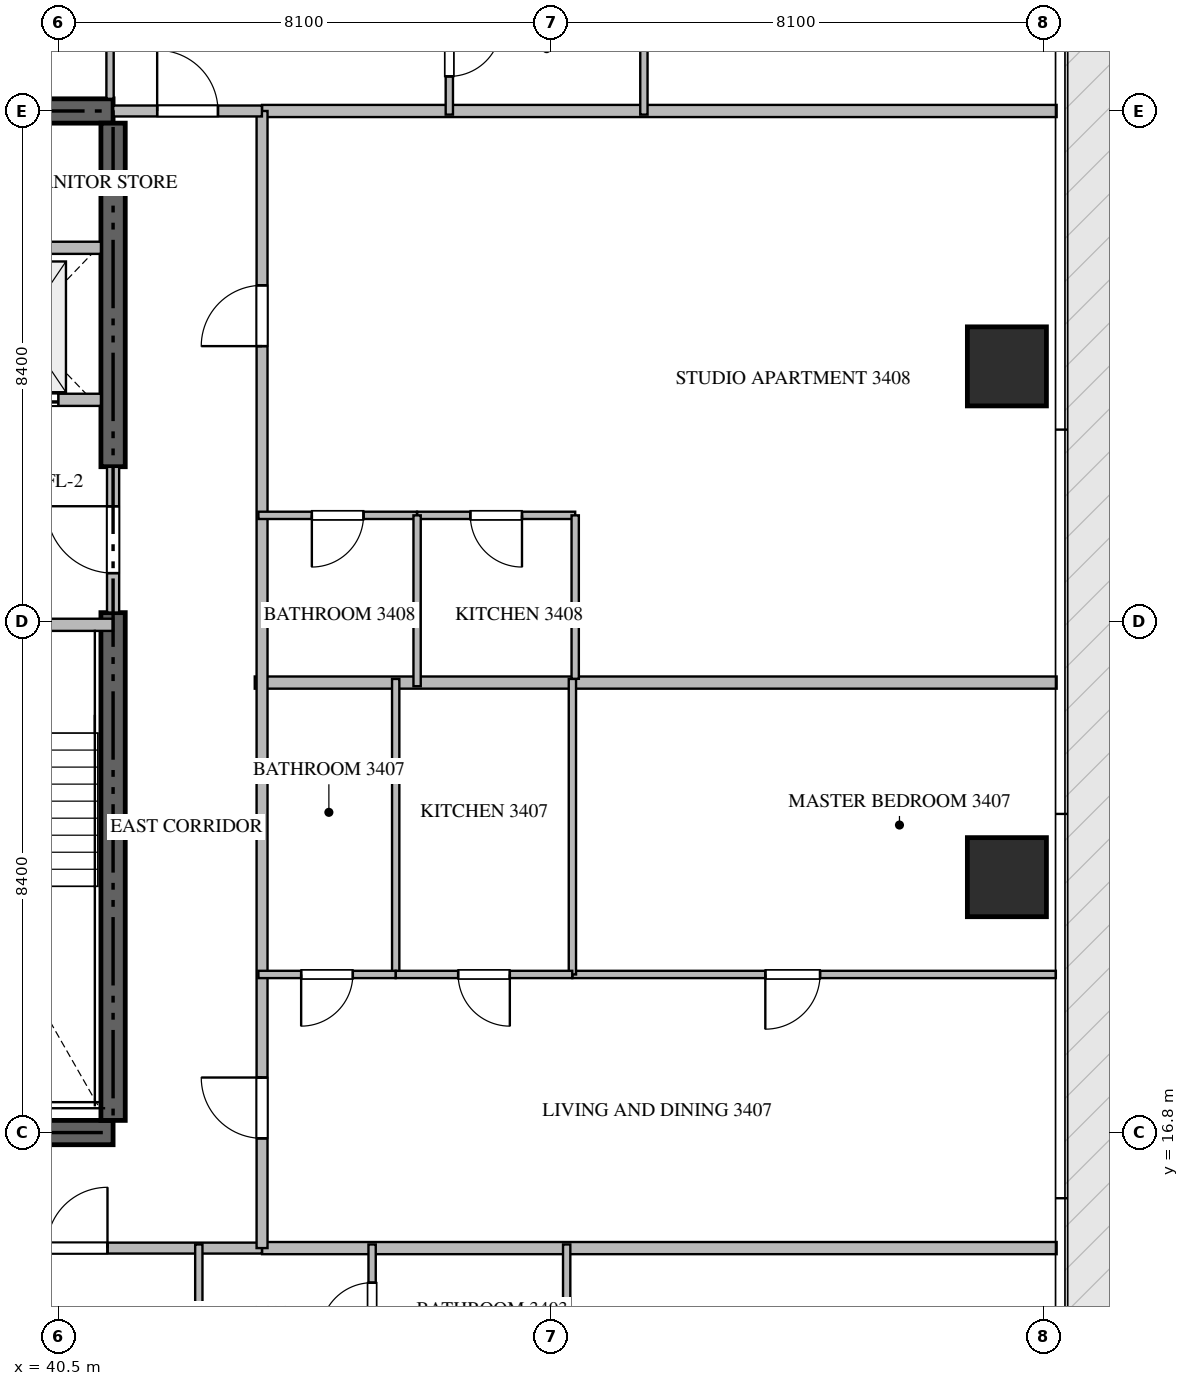
"""IFC4 building model, lengths in metres.
Left out: names, types, materials, properties, quantities, classifications, styles, units other than length and angle.
Written with IfcOpenShell. Run it as: python <this file> out.ifc"""

import sys

from ifc_helpers import new_model, si_unit, direction, frame, frame_2d, origin, origin_2d, place, context, subcontext, project, spatial, rectangle, extrude, source, transform, mapped, element, fill, save


model = new_model("IFC4")
c1 = context("Model", 3, precision=1e-05, world=origin(), true_north=direction((0.0, 1.0)))
c2 = subcontext(c1, "Body", "Model", "MODEL_VIEW")
j1 = project(units=[si_unit("LENGTHUNIT", "METRE"), si_unit("PLANEANGLEUNIT", "RADIAN")], contexts=[c1])
p1 = place(None, origin())
s1 = spatial("IfcSite", under=j1, at=p1, CompositionType="ELEMENT")
p2 = place(p1, origin())
s2 = spatial("IfcBuilding", under=s1, at=p2, CompositionType="ELEMENT")
p3 = place(p2, frame((0.0, 0.0, 138.9)))
s3 = spatial("IfcBuildingStorey", under=s2, at=p3, CompositionType="ELEMENT", Elevation=138.9)
for number, where, z_axis, x_axis in (
    (1, (23.4, 16.8, -0.26), (0.0, 0.0, 1.0), (1.0, 0.0, 0.0)),
    (2, (41.4, 33.6, -0.26), (0.0, 0.0, 1.0), (-1.0, 0.0, 0.0)),
):
    element("IfcWall", number, at=place(p3, frame(where, z_axis=z_axis, x_axis=x_axis)), inside=s3, PredefinedType="SHEAR", context=c2, shape_type="SweptSolid", body=[
        extrude(rectangle(XDim=18.0, YDim=0.4, at=frame_2d((9.0, 0.0))), origin(), (0.0, 0.0, 1.0), 3.748),
    ])
p4 = place(p3, frame((41.4, 17.0, -0.26), z_axis=(0.0, 0.0, 1.0), x_axis=(0.0, 1.0, 0.0)))
e3 = element("IfcWall", 3, at=p4, inside=s3, PredefinedType="SHEAR", context=c2, shape_type="SweptSolid", body=[
    extrude(rectangle(XDim=8.35, YDim=0.4, at=frame_2d((4.175, 0.0))), origin(), (0.0, 0.0, 1.0), 3.748),
])
p5 = place(p3, frame((41.4, 27.75, -0.26), z_axis=(0.0, 0.0, 1.0), x_axis=(0.0, 1.0, 0.0)))
e4 = element("IfcWall", 4, at=p5, inside=s3, PredefinedType="SHEAR", context=c2, shape_type="SweptSolid", body=[
    extrude(rectangle(XDim=5.65, YDim=0.4, at=frame_2d((2.825, 0.0))), origin(), (0.0, 0.0, 1.0), 3.748),
])
m1 = source(origin(), c2, "Body", "SweptSolid", [
    extrude(rectangle(XDim=1.3, YDim=1.3, at=origin_2d()), origin(), (0.0, 0.0, 1.0), 3.75),
])
for number, where, z_axis, x_axis in (
    (5, (56.1, 21.0, -0.26), (0.0, 0.0, 1.0), (1.0, 0.0, 0.0)),
    (6, (56.1, 29.4, -0.26), (0.0, 0.0, 1.0), (1.0, 0.0, 0.0)),
):
    element("IfcColumn", number, at=place(p3, frame(where, z_axis=z_axis, x_axis=x_axis)), inside=s3, PredefinedType="COLUMN", context=c2, shape_type="MappedRepresentation", body=[
        mapped(m1, transform((0.0, 0.0, 0.0), scale=1.0)),
    ])
p6 = place(p3, frame((36.95, 25.15, 0.0), z_axis=(0.0, 0.0, 1.0), x_axis=(1.0, 0.0, 0.0)))
e7 = element("IfcWall", 7, at=p6, inside=s3, PredefinedType="STANDARD", context=c2, shape_type="SweptSolid", body=[
    extrude(rectangle(XDim=4.45, YDim=0.2, at=frame_2d((2.225, 0.0))), origin(), (0.0, 0.0, 1.0), 3.49),
])
p7 = place(p6, frame((1.65, 0.0, 0.0)))
e8 = element("IfcOpeningElement", 8, at=p7, cuts=e7, PredefinedType="OPENING", context=c2, shape_type="SweptSolid", body=[
    extrude(rectangle(XDim=1.1, YDim=2.15, at=frame_2d((0.55, 1.075))), frame((0.0, 0.11, 0.0), z_axis=(0.0, -1.0, 0.0), x_axis=(1.0, 0.0, 0.0)), (0.0, 0.0, 1.0), 0.22),
])
p8 = place(p3, frame((38.75, 28.85, 0.0), z_axis=(0.0, 0.0, 1.0), x_axis=(1.0, 0.0, 0.0)))
e9 = element("IfcWall", 9, at=p8, inside=s3, PredefinedType="STANDARD", context=c2, shape_type="SweptSolid", body=[
    extrude(rectangle(XDim=2.45, YDim=0.2, at=frame_2d((1.225, 0.0))), origin(), (0.0, 0.0, 1.0), 3.49),
])
p9 = place(p8, frame((0.55, 0.0, 0.0)))
e10 = element("IfcOpeningElement", 10, at=p9, cuts=e9, PredefinedType="OPENING", context=c2, shape_type="SweptSolid", body=[
    extrude(rectangle(XDim=1.2, YDim=2.2, at=frame_2d((0.6, 1.1))), frame((0.0, 0.11, 0.0), z_axis=(0.0, -1.0, 0.0), x_axis=(1.0, 0.0, 0.0)), (0.0, 0.0, 1.0), 0.22),
])
p10 = place(p3, frame((38.75, 31.35, 0.0), z_axis=(0.0, 0.0, 1.0), x_axis=(1.0, 0.0, 0.0)))
e11 = element("IfcWall", 11, at=p10, inside=s3, PredefinedType="STANDARD", context=c2, shape_type="SweptSolid", body=[
    extrude(rectangle(XDim=2.45, YDim=0.2, at=frame_2d((1.225, 0.0))), origin(), (0.0, 0.0, 1.0), 3.49),
])
p11 = place(p3, frame((41.4, 25.352, 0.0), z_axis=(0.0, 0.0, 1.0), x_axis=(0.0, 1.0, 0.0)))
e12 = element("IfcWall", 12, at=p11, inside=s3, PredefinedType="STANDARD", context=c2, shape_type="SweptSolid", body=[
    extrude(rectangle(XDim=2.396, YDim=0.2, at=frame_2d((1.198, 0.0))), origin(), (0.0, 0.0, 1.0), 3.49),
])
p12 = place(p11, frame((0.648, 0.0, 0.0)))
e13 = element("IfcOpeningElement", 13, at=p12, cuts=e12, PredefinedType="OPENING", context=c2, shape_type="SweptSolid", body=[
    extrude(rectangle(XDim=1.1, YDim=2.15, at=frame_2d((0.55, 1.075))), frame((0.0, 0.11, 0.0), z_axis=(0.0, -1.0, 0.0), x_axis=(1.0, 0.0, 0.0)), (0.0, 0.0, 1.0), 0.22),
])
p13 = place(p3, frame((43.73, 24.2, 0.0), z_axis=(0.0, 0.0, 1.0), x_axis=(1.0, 0.0, 0.0)))
e14 = element("IfcWall", 14, at=p13, inside=s3, PredefinedType="PARTITIONING", context=c2, shape_type="SweptSolid", body=[
    extrude(rectangle(XDim=13.188, YDim=0.2, at=frame_2d((6.594, 0.0))), origin(), (0.0, 0.0, 1.0), 3.49),
])
for number, where, z_axis, x_axis in (
    (15, (43.85, 14.9, 0.0), (0.0, 0.0, 1.0), (1.0, 0.0, 0.0)),
    (16, (43.85, 33.6, 0.0), (0.0, 0.0, 1.0), (1.0, 0.0, 0.0)),
):
    element("IfcWall", number, at=place(p3, frame(where, z_axis=z_axis, x_axis=x_axis)), inside=s3, PredefinedType="PARTITIONING", context=c2, shape_type="SweptSolid", body=[
        extrude(rectangle(XDim=13.068, YDim=0.2, at=frame_2d((6.534, 0.0))), origin(), (0.0, 0.0, 1.0), 3.49),
    ])
p14 = place(p3, frame((20.952, 14.9, 0.0), z_axis=(0.0, 0.0, 1.0), x_axis=(1.0, 0.0, 0.0)))
e17 = element("IfcWall", 17, at=p14, inside=s3, PredefinedType="PARTITIONING", context=c2, shape_type="SweptSolid", body=[
    extrude(rectangle(XDim=22.896, YDim=0.18, at=frame_2d((11.448, 0.0))), origin(), (0.0, 0.0, 1.0), 3.49),
])
p15 = place(p14, frame((2.54, 0.0, 0.0)))
e18 = element("IfcOpeningElement", 18, at=p15, cuts=e17, PredefinedType="OPENING", context=c2, shape_type="SweptSolid", body=[
    extrude(rectangle(XDim=1.0, YDim=2.15, at=frame_2d((0.5, 1.075))), frame((0.0, 0.1, 0.0), z_axis=(0.0, -1.0, 0.0), x_axis=(1.0, 0.0, 0.0)), (0.0, 0.0, 1.0), 0.2),
])
p16 = place(p14, frame((14.911, 0.0, 0.0)))
e19 = element("IfcOpeningElement", 19, at=p16, cuts=e17, PredefinedType="OPENING", context=c2, shape_type="SweptSolid", body=[
    extrude(rectangle(XDim=1.0, YDim=2.15, at=frame_2d((0.5, 1.075))), frame((0.0, 0.1, 0.0), z_axis=(0.0, -1.0, 0.0), x_axis=(1.0, 0.0, 0.0)), (0.0, 0.0, 1.0), 0.2),
])
p17 = place(p14, frame((19.356, 0.0, 0.0)))
e20 = element("IfcOpeningElement", 20, at=p17, cuts=e17, PredefinedType="OPENING", context=c2, shape_type="SweptSolid", body=[
    extrude(rectangle(XDim=1.0, YDim=2.15, at=frame_2d((0.5, 1.075))), frame((0.0, 0.1, 0.0), z_axis=(0.0, -1.0, 0.0), x_axis=(1.0, 0.0, 0.0)), (0.0, 0.0, 1.0), 0.2),
])
p18 = place(p3, frame((43.85, 14.9, 0.0), z_axis=(0.0, 0.0, 1.0), x_axis=(0.0, 1.0, 0.0)))
e21 = element("IfcWall", 21, at=p18, inside=s3, PredefinedType="PARTITIONING", context=c2, shape_type="SweptSolid", body=[
    extrude(rectangle(XDim=18.7, YDim=0.18, at=frame_2d((9.35, 0.0))), origin(), (0.0, 0.0, 1.0), 3.49),
])
p19 = place(p18, frame((1.805, 0.0, 0.0)))
e22 = element("IfcOpeningElement", 22, at=p19, cuts=e21, PredefinedType="OPENING", context=c2, shape_type="SweptSolid", body=[
    extrude(rectangle(XDim=1.0, YDim=2.15, at=frame_2d((0.5, 1.075))), frame((0.0, 0.1, 0.0), z_axis=(0.0, -1.0, 0.0), x_axis=(1.0, 0.0, 0.0)), (0.0, 0.0, 1.0), 0.2),
])
p20 = place(p18, frame((14.833, 0.0, 0.0)))
e23 = element("IfcOpeningElement", 23, at=p20, cuts=e21, PredefinedType="OPENING", context=c2, shape_type="SweptSolid", body=[
    extrude(rectangle(XDim=1.0, YDim=2.15, at=frame_2d((0.5, 1.075))), frame((0.0, 0.1, 0.0), z_axis=(0.0, -1.0, 0.0), x_axis=(1.0, 0.0, 0.0)), (0.0, 0.0, 1.0), 0.2),
])
p21 = place(p3, frame((41.402, 33.6, 0.0), z_axis=(0.0, 0.0, 1.0), x_axis=(1.0, 0.0, 0.0)))
e24 = element("IfcWall", 24, at=p21, inside=s3, PredefinedType="PARTITIONING", context=c2, shape_type="SweptSolid", body=[
    extrude(rectangle(XDim=2.446, YDim=0.18, at=frame_2d((1.223, 0.0))), origin(), (0.0, 0.0, 1.0), 3.49),
])
p22 = place(p21, frame((0.723, 0.0, 0.0)))
e25 = element("IfcOpeningElement", 25, at=p22, cuts=e24, PredefinedType="OPENING", context=c2, shape_type="SweptSolid", body=[
    extrude(rectangle(XDim=1.0, YDim=2.15, at=frame_2d((0.5, 1.075))), frame((0.0, 0.1, 0.0), z_axis=(0.0, -1.0, 0.0), x_axis=(1.0, 0.0, 0.0)), (0.0, 0.0, 1.0), 0.2),
])
p23 = place(p3, frame((42.81, 12.15, 0.0), z_axis=(0.0, 0.0, 1.0), x_axis=(0.0, 1.0, 0.0)))
e26 = element("IfcWall", 26, at=p23, inside=s3, PredefinedType="PARTITIONING", context=c2, shape_type="SweptSolid", body=[
    extrude(rectangle(XDim=2.81, YDim=0.12, at=frame_2d((1.405, 0.0))), origin(), (0.0, 0.0, 1.0), 3.49),
])
p24 = place(p3, frame((48.86, 12.85, 0.0), z_axis=(0.0, 0.0, 1.0), x_axis=(0.0, 1.0, 0.0)))
e27 = element("IfcWall", 27, at=p24, inside=s3, PredefinedType="PARTITIONING", context=c2, shape_type="SweptSolid", body=[
    extrude(rectangle(XDim=2.11, YDim=0.12, at=frame_2d((1.055, 0.0))), origin(), (0.0, 0.0, 1.0), 3.49),
])
p25 = place(p3, frame((45.66, 12.852, 0.0), z_axis=(0.0, 0.0, 1.0), x_axis=(0.0, 1.0, 0.0)))
e28 = element("IfcWall", 28, at=p25, inside=s3, PredefinedType="PARTITIONING", context=c2, shape_type="SweptSolid", body=[
    extrude(rectangle(XDim=2.108, YDim=0.12, at=frame_2d((1.054, 0.0))), origin(), (0.0, 0.0, 1.0), 3.49),
])
p26 = place(p25, frame((0.629, 0.0, 0.0)))
e29 = element("IfcOpeningElement", 29, at=p26, cuts=e28, PredefinedType="OPENING", context=c2, shape_type="SweptSolid", body=[
    extrude(rectangle(XDim=0.85, YDim=2.1, at=frame_2d((0.425, 1.05))), frame((0.0, 0.07, 0.0), z_axis=(0.0, -1.0, 0.0), x_axis=(1.0, 0.0, 0.0)), (0.0, 0.0, 1.0), 0.14),
])
p27 = place(p3, frame((41.35, 36.35, 0.0), z_axis=(0.0, 0.0, 1.0), x_axis=(0.0, -1.0, 0.0)))
e30 = element("IfcWall", 30, at=p27, inside=s3, PredefinedType="PARTITIONING", context=c2, shape_type="SweptSolid", body=[
    extrude(rectangle(XDim=2.55, YDim=0.12, at=frame_2d((1.275, 0.0))), origin(), (0.0, 0.0, 1.0), 3.49),
])
p28 = place(p3, frame((50.13, 35.65, 0.0), z_axis=(0.0, 0.0, 1.0), x_axis=(0.0, -1.0, 0.0)))
e31 = element("IfcWall", 31, at=p28, inside=s3, PredefinedType="PARTITIONING", context=c2, shape_type="SweptSolid", body=[
    extrude(rectangle(XDim=2.11, YDim=0.12, at=frame_2d((1.055, 0.0))), origin(), (0.0, 0.0, 1.0), 3.49),
])
p29 = place(p3, frame((46.93, 35.648, 0.0), z_axis=(0.0, 0.0, 1.0), x_axis=(0.0, -1.0, 0.0)))
e32 = element("IfcWall", 32, at=p29, inside=s3, PredefinedType="PARTITIONING", context=c2, shape_type="SweptSolid", body=[
    extrude(rectangle(XDim=2.108, YDim=0.12, at=frame_2d((1.054, 0.0))), origin(), (0.0, 0.0, 1.0), 3.49),
])
p30 = place(p29, frame((0.629, 0.0, 0.0)))
e33 = element("IfcOpeningElement", 33, at=p30, cuts=e32, PredefinedType="OPENING", context=c2, shape_type="SweptSolid", body=[
    extrude(rectangle(XDim=0.85, YDim=2.1, at=frame_2d((0.425, 1.05))), frame((0.0, 0.07, 0.0), z_axis=(0.0, -1.0, 0.0), x_axis=(1.0, 0.0, 0.0)), (0.0, 0.0, 1.0), 0.14),
])
p31 = place(p3, frame((56.905, 19.4, 0.0), z_axis=(0.0, 0.0, 1.0), x_axis=(-1.0, 0.0, 0.0)))
e34 = element("IfcWall", 34, at=p31, inside=s3, PredefinedType="PARTITIONING", context=c2, shape_type="SweptSolid", body=[
    extrude(rectangle(XDim=7.951, YDim=0.12, at=frame_2d((3.976, 0.0))), origin(), (0.0, 0.0, 1.0), 3.49),
])
p32 = place(p31, frame((3.878, 0.0, 0.0)))
e35 = element("IfcOpeningElement", 35, at=p32, cuts=e34, PredefinedType="OPENING", context=c2, shape_type="SweptSolid", body=[
    extrude(rectangle(XDim=0.9, YDim=2.1, at=frame_2d((0.45, 1.05))), frame((0.0, 0.07, 0.0), z_axis=(0.0, -1.0, 0.0), x_axis=(1.0, 0.0, 0.0)), (0.0, 0.0, 1.0), 0.14),
])
for number, where, z_axis, x_axis in (
    (36, (48.954, 19.4, 0.0), (0.0, 0.0, 1.0), (0.0, 1.0, 0.0)),
    (37, (46.048, 19.4, 0.0), (0.0, 0.0, 1.0), (0.0, 1.0, 0.0)),
):
    element("IfcWall", number, at=place(p3, frame(where, z_axis=z_axis, x_axis=x_axis)), inside=s3, PredefinedType="PARTITIONING", context=c2, shape_type="SweptSolid", body=[
        extrude(rectangle(XDim=4.86, YDim=0.12, at=frame_2d((2.43, 0.0))), origin(), (0.0, 0.0, 1.0), 3.49),
    ])
p33 = place(p3, frame((48.952, 19.4, 0.0), z_axis=(0.0, 0.0, 1.0), x_axis=(-1.0, 0.0, 0.0)))
e38 = element("IfcWall", 38, at=p33, inside=s3, PredefinedType="PARTITIONING", context=c2, shape_type="SweptSolid", body=[
    extrude(rectangle(XDim=2.904, YDim=0.12, at=frame_2d((1.452, 0.0))), origin(), (0.0, 0.0, 1.0), 3.49),
])
p34 = place(p33, frame((1.027, 0.0, 0.0)))
e39 = element("IfcOpeningElement", 39, at=p34, cuts=e38, PredefinedType="OPENING", context=c2, shape_type="SweptSolid", body=[
    extrude(rectangle(XDim=0.85, YDim=2.1, at=frame_2d((0.425, 1.05))), frame((0.0, 0.07, 0.0), z_axis=(0.0, -1.0, 0.0), x_axis=(1.0, 0.0, 0.0)), (0.0, 0.0, 1.0), 0.14),
])
p35 = place(p3, frame((46.046, 19.4, 0.0), z_axis=(0.0, 0.0, 1.0), x_axis=(-1.0, 0.0, 0.0)))
e40 = element("IfcWall", 40, at=p35, inside=s3, PredefinedType="PARTITIONING", context=c2, shape_type="SweptSolid", body=[
    extrude(rectangle(XDim=2.256, YDim=0.12, at=frame_2d((1.128, 0.0))), origin(), (0.0, 0.0, 1.0), 3.49),
])
p36 = place(p35, frame((0.703, 0.0, 0.0)))
e41 = element("IfcOpeningElement", 41, at=p36, cuts=e40, PredefinedType="OPENING", context=c2, shape_type="SweptSolid", body=[
    extrude(rectangle(XDim=0.85, YDim=2.1, at=frame_2d((0.425, 1.05))), frame((0.0, 0.07, 0.0), z_axis=(0.0, -1.0, 0.0), x_axis=(1.0, 0.0, 0.0)), (0.0, 0.0, 1.0), 0.14),
])
p37 = place(p3, frame((49.0, 26.95, 0.0), z_axis=(0.0, 0.0, 1.0), x_axis=(-1.0, 0.0, 0.0)))
e42 = element("IfcWall", 42, at=p37, inside=s3, PredefinedType="PARTITIONING", context=c2, shape_type="SweptSolid", body=[
    extrude(rectangle(XDim=2.6, YDim=0.12, at=frame_2d((1.3, 0.0))), origin(), (0.0, 0.0, 1.0), 3.49),
])
p38 = place(p37, frame((0.875, 0.0, 0.0)))
e43 = element("IfcOpeningElement", 43, at=p38, cuts=e42, PredefinedType="OPENING", context=c2, shape_type="SweptSolid", body=[
    extrude(rectangle(XDim=0.85, YDim=2.1, at=frame_2d((0.425, 1.05))), frame((0.0, 0.07, 0.0), z_axis=(0.0, -1.0, 0.0), x_axis=(1.0, 0.0, 0.0)), (0.0, 0.0, 1.0), 0.14),
])
p39 = place(p3, frame((46.398, 26.95, 0.0), z_axis=(0.0, 0.0, 1.0), x_axis=(-1.0, 0.0, 0.0)))
e44 = element("IfcWall", 44, at=p39, inside=s3, PredefinedType="PARTITIONING", context=c2, shape_type="SweptSolid", body=[
    extrude(rectangle(XDim=2.608, YDim=0.12, at=frame_2d((1.304, 0.0))), origin(), (0.0, 0.0, 1.0), 3.49),
])
p40 = place(p39, frame((0.879, 0.0, 0.0)))
e45 = element("IfcOpeningElement", 45, at=p40, cuts=e44, PredefinedType="OPENING", context=c2, shape_type="SweptSolid", body=[
    extrude(rectangle(XDim=0.85, YDim=2.1, at=frame_2d((0.425, 1.05))), frame((0.0, 0.07, 0.0), z_axis=(0.0, -1.0, 0.0), x_axis=(1.0, 0.0, 0.0)), (0.0, 0.0, 1.0), 0.14),
])
p41 = place(p3, frame((46.4, 24.14, 0.0), z_axis=(0.0, 0.0, 1.0), x_axis=(0.0, 1.0, 0.0)))
e46 = element("IfcWall", 46, at=p41, inside=s3, PredefinedType="PARTITIONING", context=c2, shape_type="SweptSolid", body=[
    extrude(rectangle(XDim=2.81, YDim=0.12, at=frame_2d((1.405, 0.0))), origin(), (0.0, 0.0, 1.0), 3.49),
])
p42 = place(p3, frame((49.0, 24.262, 0.0), z_axis=(0.0, 0.0, 1.0), x_axis=(0.0, 1.0, 0.0)))
e47 = element("IfcWall", 47, at=p42, inside=s3, PredefinedType="PARTITIONING", context=c2, shape_type="SweptSolid", body=[
    extrude(rectangle(XDim=2.688, YDim=0.12, at=frame_2d((1.344, 0.0))), origin(), (0.0, 0.0, 1.0), 3.49),
])
m2 = source(origin(), c2, "Body", "SweptSolid", [
    extrude(rectangle(XDim=1.2, YDim=2.2, at=frame_2d((0.6, 1.1))), frame((0.0, 0.025, 0.0), z_axis=(0.0, -1.0, 0.0), x_axis=(1.0, 0.0, 0.0)), (0.0, 0.0, 1.0), 0.05),
])
p43 = place(p9, origin())
e48 = element("IfcDoor", 48, at=p43, inside=s3, OperationType="DOUBLE_DOOR_SLIDING", PredefinedType="DOOR", context=c2, shape_type="MappedRepresentation", body=[
    mapped(m2, transform((0.0, 0.0, 0.0), scale=1.0)),
])
fill(e10, e48)
m3 = source(origin(), c2, "Body", "SweptSolid", [
    extrude(rectangle(XDim=1.1, YDim=2.15, at=frame_2d((0.55, 1.075))), frame((0.0, 0.025, 0.0), z_axis=(0.0, -1.0, 0.0), x_axis=(1.0, 0.0, 0.0)), (0.0, 0.0, 1.0), 0.05),
])
p44 = place(p12, origin())
e49 = element("IfcDoor", 49, at=p44, inside=s3, OperationType="SINGLE_SWING_RIGHT", PredefinedType="DOOR", context=c2, shape_type="MappedRepresentation", body=[
    mapped(m3, transform((0.0, 0.0, 0.0), scale=1.0)),
])
fill(e13, e49)
m4 = source(origin(), c2, "Body", "SweptSolid", [
    extrude(rectangle(XDim=1.0, YDim=2.15, at=frame_2d((0.5, 1.075))), frame((0.0, 0.025, 0.0), z_axis=(0.0, -1.0, 0.0), x_axis=(1.0, 0.0, 0.0)), (0.0, 0.0, 1.0), 0.05),
])
p45 = place(p17, origin())
e50 = element("IfcDoor", 50, at=p45, inside=s3, OperationType="SINGLE_SWING_RIGHT", PredefinedType="DOOR", context=c2, shape_type="MappedRepresentation", body=[
    mapped(m4, transform((0.0, 0.0, 0.0), scale=1.0)),
])
fill(e20, e50)
p46 = place(p19, origin())
e51 = element("IfcDoor", 51, at=p46, inside=s3, OperationType="SINGLE_SWING_RIGHT", PredefinedType="DOOR", context=c2, shape_type="MappedRepresentation", body=[
    mapped(m4, transform((0.0, 0.0, 0.0), scale=1.0)),
])
fill(e22, e51)
p47 = place(p20, origin())
e52 = element("IfcDoor", 52, at=p47, inside=s3, OperationType="SINGLE_SWING_LEFT", PredefinedType="DOOR", context=c2, shape_type="MappedRepresentation", body=[
    mapped(m4, transform((0.0, 0.0, 0.0), scale=1.0)),
])
fill(e23, e52)
p48 = place(p22, origin())
e53 = element("IfcDoor", 53, at=p48, inside=s3, OperationType="SINGLE_SWING_LEFT", PredefinedType="DOOR", context=c2, shape_type="MappedRepresentation", body=[
    mapped(m4, transform((0.0, 0.0, 0.0), scale=1.0)),
])
fill(e25, e53)
m5 = source(origin(), c2, "Body", "SweptSolid", [
    extrude(rectangle(XDim=0.85, YDim=2.1, at=frame_2d((0.425, 1.05))), frame((0.0, 0.025, 0.0), z_axis=(0.0, -1.0, 0.0), x_axis=(1.0, 0.0, 0.0)), (0.0, 0.0, 1.0), 0.05),
])
p49 = place(p26, origin())
e54 = element("IfcDoor", 54, at=p49, inside=s3, OperationType="SINGLE_SWING_LEFT", PredefinedType="DOOR", context=c2, shape_type="MappedRepresentation", body=[
    mapped(m5, transform((0.0, 0.0, 0.0), scale=1.0)),
])
fill(e29, e54)
p50 = place(p30, origin())
e55 = element("IfcDoor", 55, at=p50, inside=s3, OperationType="SINGLE_SWING_LEFT", PredefinedType="DOOR", context=c2, shape_type="MappedRepresentation", body=[
    mapped(m5, transform((0.0, 0.0, 0.0), scale=1.0)),
])
fill(e33, e55)
m6 = source(origin(), c2, "Body", "SweptSolid", [
    extrude(rectangle(XDim=0.9, YDim=2.1, at=frame_2d((0.45, 1.05))), frame((0.0, 0.025, 0.0), z_axis=(0.0, -1.0, 0.0), x_axis=(1.0, 0.0, 0.0)), (0.0, 0.0, 1.0), 0.05),
])
p51 = place(p32, origin())
e56 = element("IfcDoor", 56, at=p51, inside=s3, OperationType="SINGLE_SWING_RIGHT", PredefinedType="DOOR", context=c2, shape_type="MappedRepresentation", body=[
    mapped(m6, transform((0.0, 0.0, 0.0), scale=1.0)),
])
fill(e35, e56)
p52 = place(p34, origin())
e57 = element("IfcDoor", 57, at=p52, inside=s3, OperationType="SINGLE_SWING_LEFT", PredefinedType="DOOR", context=c2, shape_type="MappedRepresentation", body=[
    mapped(m5, transform((0.0, 0.0, 0.0), scale=1.0)),
])
fill(e39, e57)
p53 = place(p36, origin())
e58 = element("IfcDoor", 58, at=p53, inside=s3, OperationType="SINGLE_SWING_RIGHT", PredefinedType="DOOR", context=c2, shape_type="MappedRepresentation", body=[
    mapped(m5, transform((0.0, 0.0, 0.0), scale=1.0)),
])
fill(e41, e58)
p54 = place(p38, origin())
e59 = element("IfcDoor", 59, at=p54, inside=s3, OperationType="SINGLE_SWING_LEFT", PredefinedType="DOOR", context=c2, shape_type="MappedRepresentation", body=[
    mapped(m5, transform((0.0, 0.0, 0.0), scale=1.0)),
])
fill(e43, e59)
p55 = place(p40, origin())
e60 = element("IfcDoor", 60, at=p55, inside=s3, OperationType="SINGLE_SWING_RIGHT", PredefinedType="DOOR", context=c2, shape_type="MappedRepresentation", body=[
    mapped(m5, transform((0.0, 0.0, 0.0), scale=1.0)),
])
fill(e45, e60)
save(model, sys.argv[1])
